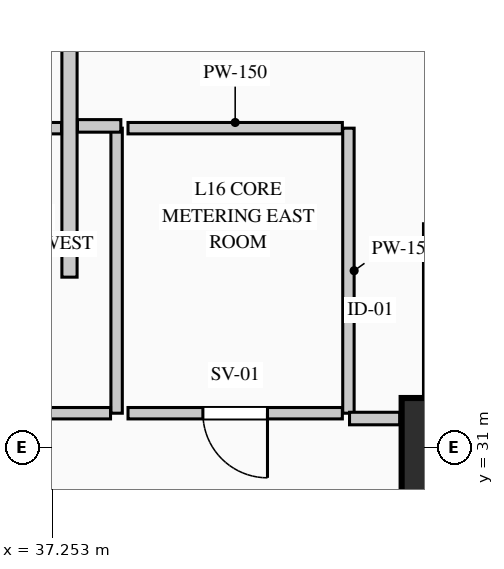
"""IFC4 building model, lengths in metres.
Left out: names, types, materials, properties, quantities, classifications, styles, units other than length and angle.
Written with IfcOpenShell. Run it as: python <this file> out.ifc"""

import sys

from ifc_helpers import new_model, si_unit, direction, frame, frame_2d, origin, origin_2d, place, context, subcontext, project, spatial, rectangle, extrude, element, fill, save


model = new_model("IFC4")
c1 = context("Model", 3, precision=1e-05, world=origin(), true_north=direction((0.0, 1.0)))
c2 = subcontext(c1, "Body", "Model", "MODEL_VIEW")
j1 = project(units=[si_unit("LENGTHUNIT", "METRE"), si_unit("PLANEANGLEUNIT", "RADIAN")], contexts=[c1])
p1 = place(None, origin())
s1 = spatial("IfcSite", under=j1, at=p1, CompositionType="ELEMENT")
p2 = place(p1, origin())
s2 = spatial("IfcBuilding", under=s1, at=p2, CompositionType="ELEMENT")
p3 = place(p2, frame((0.0, 0.0, 71.0)))
s3 = spatial("IfcBuildingStorey", under=s2, at=p3, CompositionType="ELEMENT", Elevation=71.0)
p4 = place(p3, frame((42.5, 31.0, 0.0), z_axis=(0.0, 0.0, 1.0), x_axis=(1.0, 0.0, 0.0)))
e1 = element("IfcColumn", 1, at=p4, inside=s3, PredefinedType="COLUMN", context=c2, shape_type="SweptSolid", body=[
    extrude(rectangle(XDim=1.3, YDim=1.3, at=origin_2d()), origin(), (0.0, 0.0, 1.0), 4.4),
])
p5 = place(p3, frame((37.48, 33.24, 0.0), z_axis=(0.0, 0.0, 1.0), x_axis=(0.0, 1.0, 0.0)))
e2 = element("IfcWall", 2, at=p5, inside=s3, PredefinedType="PARTITIONING", context=c2, shape_type="SweptSolid", body=[
    extrude(rectangle(XDim=7.42, YDim=0.2, at=frame_2d((3.71, 0.0))), origin(), (0.0, 0.0, 1.0), 4.1),
])
p6 = place(p3, frame((38.1, 35.2, 0.0), z_axis=(0.0, 0.0, 1.0), x_axis=(0.0, -1.0, 0.0)))
e3 = element("IfcWall", 3, at=p6, inside=s3, PredefinedType="PARTITIONING", context=c2, shape_type="SweptSolid", body=[
    extrude(rectangle(XDim=3.75, YDim=0.15, at=frame_2d((1.875, 0.0))), origin(), (0.0, 0.0, 1.0), 4.1),
])
p7 = place(p3, frame((38.02, 31.45, 0.0), z_axis=(0.0, 0.0, 1.0), x_axis=(-1.0, 0.0, 0.0)))
e4 = element("IfcWall", 4, at=p7, inside=s3, PredefinedType="PARTITIONING", context=c2, shape_type="SweptSolid", body=[
    extrude(rectangle(XDim=2.77, YDim=0.15, at=frame_2d((1.385, 0.0))), origin(), (0.0, 0.0, 1.0), 4.1),
])
p8 = place(p7, frame((0.96, 0.0, 0.0)))
e5 = element("IfcOpeningElement", 5, at=p8, cuts=e4, PredefinedType="OPENING", context=c2, shape_type="SweptSolid", body=[
    extrude(rectangle(XDim=0.85, YDim=2.1, at=frame_2d((0.425, 1.05))), frame((0.0, 0.085, 0.0), z_axis=(0.0, -1.0, 0.0), x_axis=(1.0, 0.0, 0.0)), (0.0, 0.0, 1.0), 0.17),
])
p9 = place(p3, frame((35.33, 35.2, 0.0), z_axis=(0.0, 0.0, 1.0), x_axis=(1.0, 0.0, 0.0)))
e6 = element("IfcWall", 6, at=p9, inside=s3, PredefinedType="PARTITIONING", context=c2, shape_type="SweptSolid", body=[
    extrude(rectangle(XDim=2.045, YDim=0.15, at=frame_2d((1.022, 0.0))), origin(), (0.0, 0.0, 1.0), 4.1),
])
p10 = place(p3, frame((41.15, 35.2, 0.0), z_axis=(0.0, 0.0, 1.0), x_axis=(0.0, -1.0, 0.0)))
e7 = element("IfcWall", 7, at=p10, inside=s3, PredefinedType="PARTITIONING", context=c2, shape_type="SweptSolid", body=[
    extrude(rectangle(XDim=3.75, YDim=0.15, at=frame_2d((1.875, 0.0))), origin(), (0.0, 0.0, 1.0), 4.1),
])
p11 = place(p3, frame((41.07, 31.45, 0.0), z_axis=(0.0, 0.0, 1.0), x_axis=(-1.0, 0.0, 0.0)))
e8 = element("IfcWall", 8, at=p11, inside=s3, PredefinedType="PARTITIONING", context=c2, shape_type="SweptSolid", body=[
    extrude(rectangle(XDim=2.82, YDim=0.15, at=frame_2d((1.41, 0.0))), origin(), (0.0, 0.0, 1.0), 4.1),
])
p12 = place(p11, frame((0.985, 0.0, 0.0)))
e9 = element("IfcOpeningElement", 9, at=p12, cuts=e8, PredefinedType="OPENING", context=c2, shape_type="SweptSolid", body=[
    extrude(rectangle(XDim=0.85, YDim=2.1, at=frame_2d((0.425, 1.05))), frame((0.0, 0.085, 0.0), z_axis=(0.0, -1.0, 0.0), x_axis=(1.0, 0.0, 0.0)), (0.0, 0.0, 1.0), 0.17),
])
p13 = place(p3, frame((38.25, 35.2, 0.0), z_axis=(0.0, 0.0, 1.0), x_axis=(1.0, 0.0, 0.0)))
e10 = element("IfcWall", 10, at=p13, inside=s3, PredefinedType="PARTITIONING", context=c2, shape_type="SweptSolid", body=[
    extrude(rectangle(XDim=2.82, YDim=0.15, at=frame_2d((1.41, 0.0))), origin(), (0.0, 0.0, 1.0), 4.1),
])
p14 = place(p3, frame((42.22, 33.942, 0.0), z_axis=(0.0, 0.0, 1.0), x_axis=(0.0, -1.0, 0.0)))
e11 = element("IfcWall", 11, at=p14, inside=s3, PredefinedType="PARTITIONING", context=c2, shape_type="SweptSolid", body=[
    extrude(rectangle(XDim=2.267, YDim=0.165, at=frame_2d((1.134, 0.0))), origin(), (0.0, 0.0, 1.0), 4.1),
])
p15 = place(p14, frame((0.634, 0.0, 0.0)))
e12 = element("IfcOpeningElement", 12, at=p15, cuts=e11, PredefinedType="OPENING", context=c2, shape_type="SweptSolid", body=[
    extrude(rectangle(XDim=1.0, YDim=2.15, at=frame_2d((0.5, 1.075))), frame((0.0, 0.093, 0.0), z_axis=(0.0, -1.0, 0.0), x_axis=(1.0, 0.0, 0.0)), (0.0, 0.0, 1.0), 0.185),
])
p16 = place(p3, frame((41.825, 31.38, 0.0), z_axis=(0.0, 0.0, 1.0), x_axis=(-1.0, 0.0, 0.0)))
e13 = element("IfcWall", 13, at=p16, inside=s3, PredefinedType="PARTITIONING", context=c2, shape_type="SweptSolid", body=[
    extrude(rectangle(XDim=0.66, YDim=0.165, at=frame_2d((0.33, 0.0))), origin(), (0.0, 0.0, 1.0), 4.1),
])
p17 = place(p3, frame((38.156, 35.23, 0.0), z_axis=(0.0, 0.0, 1.0), x_axis=(-1.0, 0.0, 0.0)))
e14 = element("IfcWall", 14, at=p17, inside=s3, PredefinedType="PARTITIONING", context=c2, shape_type="SweptSolid", body=[
    extrude(rectangle(XDim=0.571, YDim=0.165, at=frame_2d((0.285, 0.0))), origin(), (0.0, 0.0, 1.0), 4.1),
])
p18 = place(p12, origin())
e15 = element("IfcDoor", 15, at=p18, inside=s3, OperationType="SINGLE_SWING_LEFT", PredefinedType="DOOR", context=c2, shape_type="SweptSolid", body=[
    extrude(rectangle(XDim=0.85, YDim=2.1, at=frame_2d((0.425, 1.05))), frame((0.0, 0.025, 0.0), z_axis=(0.0, -1.0, 0.0), x_axis=(1.0, 0.0, 0.0)), (0.0, 0.0, 1.0), 0.05),
])
fill(e9, e15)
save(model, sys.argv[1])
